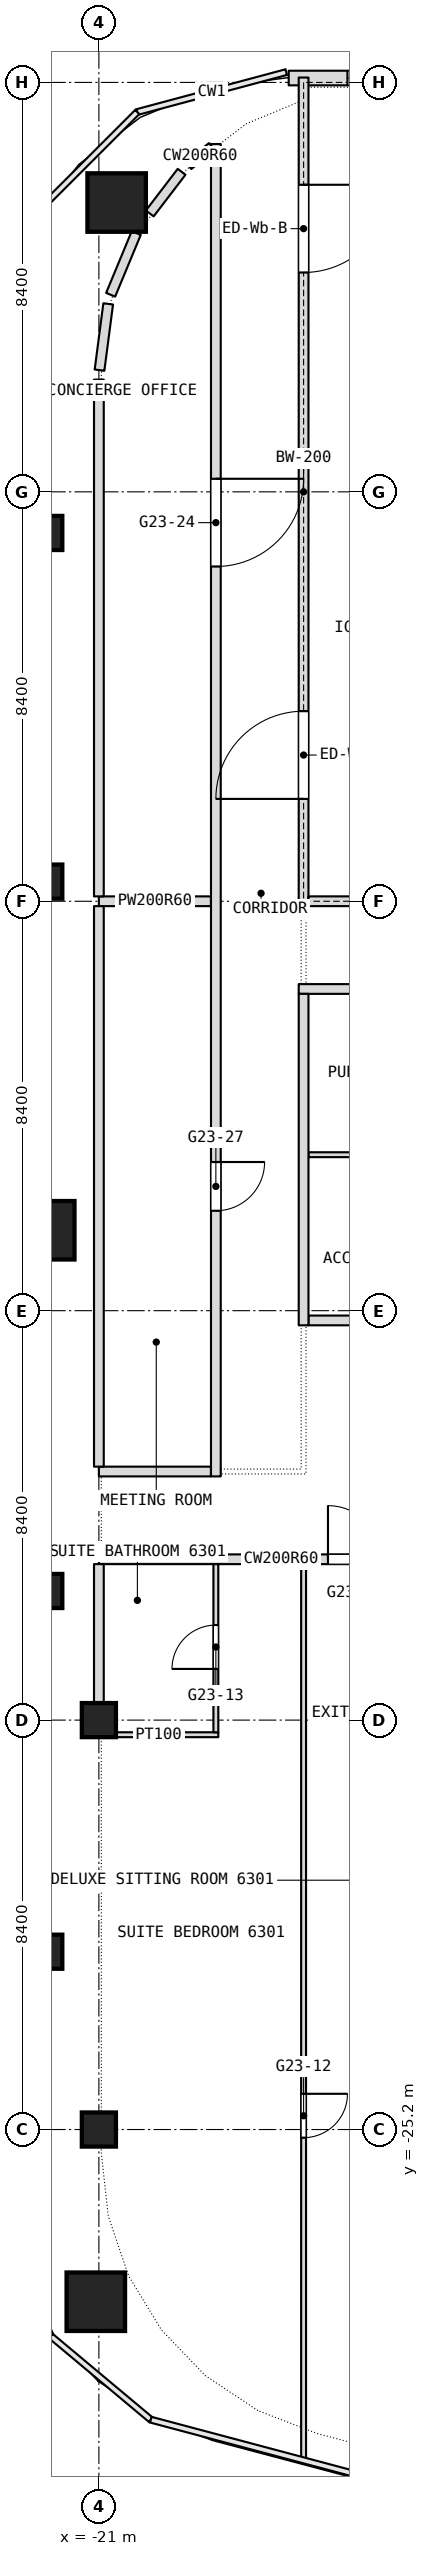
"""IFC4 building model, lengths in metres.
Left out: names, types, materials, properties, quantities, classifications, styles, units other than length and angle.
Written with IfcOpenShell. Run it as: python <this file> out.ifc"""

import sys

from ifc_helpers import new_model, si_unit, direction, frame, frame_2d, origin, origin_2d, place, context, subcontext, project, spatial, rectangle, extrude, element, fill, save


model = new_model("IFC4")
c1 = context("Model", 3, precision=1e-05, world=origin(), true_north=direction((0.0, 1.0)))
c2 = subcontext(c1, "Body", "Model", "MODEL_VIEW")
j1 = project(units=[si_unit("LENGTHUNIT", "METRE"), si_unit("PLANEANGLEUNIT", "RADIAN")], contexts=[c1])
p1 = place(None, origin())
s1 = spatial("IfcSite", under=j1, at=p1, CompositionType="ELEMENT")
p2 = place(p1, origin())
s2 = spatial("IfcBuilding", under=s1, at=p2, CompositionType="ELEMENT")
p3 = place(p2, frame((0.0, 0.0, 274.1)))
s3 = spatial("IfcBuildingStorey", under=s2, at=p3, CompositionType="ELEMENT", Elevation=274.1)
for number, where, z_axis, x_axis in (
    (1, (-21.063, -28.733, 0.0), (0.0, 0.0, 1.0), (1.0, 0.0, 0.0)),
    (2, (-20.635, 14.335, 0.0), (0.0, 0.0, 1.0), (1.0, 0.0, 0.0)),
    (3, (-22.1, -6.75, 0.0), (0.0, 0.0, 1.0), (1.0, 0.0, 0.0)),
):
    element("IfcColumn", number, at=place(p3, frame(where, z_axis=z_axis, x_axis=x_axis)), inside=s3, PredefinedType="COLUMN", context=c2, shape_type="SweptSolid", body=[
        extrude(rectangle(XDim=1.2, YDim=1.2, at=origin_2d()), origin(), (0.0, 0.0, 1.0), 3.6),
    ])
for number, where, z_axis, x_axis in (
    (4, (-21.0, -25.2, 0.0), (0.0, 0.0, 1.0), (1.0, 0.0, 0.0)),
    (5, (-21.0, -16.8, 0.0), (0.0, 0.0, 1.0), (1.0, 0.0, 0.0)),
    (6, (-22.1, -21.552, 0.0), (0.0, 0.0, 1.0), (1.0, 0.0, 0.0)),
    (7, (-22.1, -14.151, 0.0), (0.0, 0.0, 1.0), (1.0, 0.0, 0.0)),
    (8, (-22.1, 0.403, 0.0), (0.0, 0.0, 1.0), (1.0, 0.0, 0.0)),
    (9, (-22.1, 7.556, 0.0), (0.0, 0.0, 1.0), (1.0, 0.0, 0.0)),
):
    element("IfcColumn", number, at=place(p3, frame(where, z_axis=z_axis, x_axis=x_axis)), inside=s3, PredefinedType="COLUMN", context=c2, shape_type="SweptSolid", body=[
        extrude(rectangle(XDim=0.7, YDim=0.7, at=origin_2d()), origin(), (0.0, 0.0, 1.0), 3.6),
    ])
p4 = place(p3, frame((-21.0, -17.1, 0.0), z_axis=(0.0, 0.0, 1.0), x_axis=(1.0, 0.0, 0.0)))
e10 = element("IfcWall", 10, at=p4, inside=s3, PredefinedType="PARTITIONING", context=c2, shape_type="SweptSolid", body=[
    extrude(rectangle(XDim=2.45, YDim=0.1, at=frame_2d((1.225, 0.0))), origin(), (0.0, 0.0, 1.0), 3.34),
])
p5 = place(p3, frame((-21.0, -13.5, 0.0), z_axis=(0.0, 0.0, 1.0), x_axis=(1.0, 0.0, 0.0)))
e11 = element("IfcWall", 11, at=p5, inside=s3, PredefinedType="PARTITIONING", context=c2, shape_type="SweptSolid", body=[
    extrude(rectangle(XDim=6.1, YDim=0.2, at=frame_2d((3.05, 0.0))), origin(), (0.0, 0.0, 1.0), 3.34),
])
p6 = place(p5, frame((4.7, 0.0, 0.0)))
e12 = element("IfcOpeningElement", 12, at=p6, cuts=e11, PredefinedType="OPENING", context=c2, shape_type="SweptSolid", body=[
    extrude(rectangle(XDim=1.1, YDim=2.1, at=frame_2d((0.55, 1.05))), frame((0.0, 0.1, 0.0), z_axis=(0.0, -1.0, 0.0), x_axis=(1.0, 0.0, 0.0)), (0.0, 0.0, 1.0), 0.2),
])
p7 = place(p3, frame((-21.0, -11.7, 0.0), z_axis=(0.0, 0.0, 1.0), x_axis=(1.0, 0.0, 0.0)))
e13 = element("IfcWall", 13, at=p7, inside=s3, PredefinedType="PARTITIONING", context=c2, shape_type="SweptSolid", body=[
    extrude(rectangle(XDim=2.3, YDim=0.2, at=frame_2d((1.15, 0.0))), origin(), (0.0, 0.0, 1.0), 3.34),
])
p8 = place(p3, frame((-16.7, -8.6, 0.0), z_axis=(0.0, 0.0, 1.0), x_axis=(1.0, 0.0, 0.0)))
e14 = element("IfcWall", 14, at=p8, inside=s3, PredefinedType="PARTITIONING", context=c2, shape_type="SweptSolid", body=[
    extrude(rectangle(XDim=8.4, YDim=0.2, at=frame_2d((4.2, 0.0))), origin(), (0.0, 0.0, 1.0), 3.34),
])
p9 = place(p3, frame((-16.7, -5.2, 0.0), z_axis=(0.0, 0.0, 1.0), x_axis=(1.0, 0.0, 0.0)))
e15 = element("IfcWall", 15, at=p9, inside=s3, PredefinedType="PARTITIONING", context=c2, shape_type="SweptSolid", body=[
    extrude(rectangle(XDim=4.2, YDim=0.1, at=frame_2d((2.1, 0.0))), origin(), (0.0, 0.0, 1.0), 3.34),
])
p10 = place(p9, frame((1.55, 0.0, 0.0)))
e16 = element("IfcOpeningElement", 16, at=p10, cuts=e15, PredefinedType="OPENING", context=c2, shape_type="SweptSolid", body=[
    extrude(rectangle(XDim=0.9, YDim=2.1, at=frame_2d((0.45, 1.05))), frame((0.0, 0.05, 0.0), z_axis=(0.0, -1.0, 0.0), x_axis=(1.0, 0.0, 0.0)), (0.0, 0.0, 1.0), 0.1),
])
p11 = place(p3, frame((-16.9, -1.8, 0.0), z_axis=(0.0, 0.0, 1.0), x_axis=(1.0, 0.0, 0.0)))
e17 = element("IfcWall", 17, at=p11, inside=s3, PredefinedType="PARTITIONING", context=c2, shape_type="SweptSolid", body=[
    extrude(rectangle(XDim=33.8, YDim=0.2, at=frame_2d((16.9, 0.0))), origin(), (0.0, 0.0, 1.0), 3.34),
])
p12 = place(p11, frame((1.7, 0.0, 0.0)))
e18 = element("IfcOpeningElement", 18, at=p12, cuts=e17, PredefinedType="OPENING", context=c2, shape_type="SweptSolid", body=[
    extrude(rectangle(XDim=1.0, YDim=2.1, at=frame_2d((0.5, 1.05))), frame((0.0, 0.1, 0.0), z_axis=(0.0, -1.0, 0.0), x_axis=(1.0, 0.0, 0.0)), (0.0, 0.0, 1.0), 0.2),
])
p13 = place(p11, frame((5.9, 0.0, 0.0)))
e19 = element("IfcOpeningElement", 19, at=p13, cuts=e17, PredefinedType="OPENING", context=c2, shape_type="SweptSolid", body=[
    extrude(rectangle(XDim=1.0, YDim=2.1, at=frame_2d((0.5, 1.05))), frame((0.0, 0.1, 0.0), z_axis=(0.0, -1.0, 0.0), x_axis=(1.0, 0.0, 0.0)), (0.0, 0.0, 1.0), 0.2),
])
p14 = place(p11, frame((10.1, 0.0, 0.0)))
e20 = element("IfcOpeningElement", 20, at=p14, cuts=e17, PredefinedType="OPENING", context=c2, shape_type="SweptSolid", body=[
    extrude(rectangle(XDim=1.0, YDim=2.1, at=frame_2d((0.5, 1.05))), frame((0.0, 0.1, 0.0), z_axis=(0.0, -1.0, 0.0), x_axis=(1.0, 0.0, 0.0)), (0.0, 0.0, 1.0), 0.2),
])
p15 = place(p11, frame((16.0, 0.0, 0.0)))
e21 = element("IfcOpeningElement", 21, at=p15, cuts=e17, PredefinedType="OPENING", context=c2, shape_type="SweptSolid", body=[
    extrude(rectangle(XDim=1.8, YDim=2.1, at=frame_2d((0.9, 1.05))), frame((0.0, 0.1, 0.0), z_axis=(0.0, -1.0, 0.0), x_axis=(1.0, 0.0, 0.0)), (0.0, 0.0, 1.0), 0.2),
])
p16 = place(p11, frame((22.7, 0.0, 0.0)))
e22 = element("IfcOpeningElement", 22, at=p16, cuts=e17, PredefinedType="OPENING", context=c2, shape_type="SweptSolid", body=[
    extrude(rectangle(XDim=1.0, YDim=2.1, at=frame_2d((0.5, 1.05))), frame((0.0, 0.1, 0.0), z_axis=(0.0, -1.0, 0.0), x_axis=(1.0, 0.0, 0.0)), (0.0, 0.0, 1.0), 0.2),
])
p17 = place(p11, frame((26.9, 0.0, 0.0)))
e23 = element("IfcOpeningElement", 23, at=p17, cuts=e17, PredefinedType="OPENING", context=c2, shape_type="SweptSolid", body=[
    extrude(rectangle(XDim=1.0, YDim=2.1, at=frame_2d((0.5, 1.05))), frame((0.0, 0.1, 0.0), z_axis=(0.0, -1.0, 0.0), x_axis=(1.0, 0.0, 0.0)), (0.0, 0.0, 1.0), 0.2),
])
p18 = place(p11, frame((31.1, 0.0, 0.0)))
e24 = element("IfcOpeningElement", 24, at=p18, cuts=e17, PredefinedType="OPENING", context=c2, shape_type="SweptSolid", body=[
    extrude(rectangle(XDim=1.0, YDim=2.1, at=frame_2d((0.5, 1.05))), frame((0.0, 0.1, 0.0), z_axis=(0.0, -1.0, 0.0), x_axis=(1.0, 0.0, 0.0)), (0.0, 0.0, 1.0), 0.2),
])
p19 = place(p3, frame((-21.0, 0.0, 0.0), z_axis=(0.0, 0.0, 1.0), x_axis=(1.0, 0.0, 0.0)))
e25 = element("IfcWall", 25, at=p19, inside=s3, PredefinedType="PARTITIONING", context=c2, shape_type="SweptSolid", body=[
    extrude(rectangle(XDim=2.3, YDim=0.2, at=frame_2d((1.15, 0.0))), origin(), (0.0, 0.0, 1.0), 3.0),
])
p20 = place(p3, frame((-16.8, -31.957, 0.0), z_axis=(0.0, 0.0, 1.0), x_axis=(0.0, 1.0, 0.0)))
e26 = element("IfcWall", 26, at=p20, inside=s3, PredefinedType="PARTITIONING", context=c2, shape_type="SweptSolid", body=[
    extrude(rectangle(XDim=18.357, YDim=0.1, at=frame_2d((9.178, 0.0))), origin(), (0.0, 0.0, 1.0), 3.34),
])
p21 = place(p20, frame((6.59, 0.0, 0.0)))
e27 = element("IfcOpeningElement", 27, at=p21, cuts=e26, PredefinedType="OPENING", context=c2, shape_type="SweptSolid", body=[
    extrude(rectangle(XDim=0.9, YDim=2.1, at=frame_2d((0.45, 1.05))), frame((0.0, 0.05, 0.0), z_axis=(0.0, -1.0, 0.0), x_axis=(1.0, 0.0, 0.0)), (0.0, 0.0, 1.0), 0.1),
])
p22 = place(p3, frame((-16.8, -8.7, 0.0), z_axis=(0.0, 0.0, 1.0), x_axis=(0.0, 1.0, 0.0)))
e28 = element("IfcWall", 28, at=p22, inside=s3, PredefinedType="PARTITIONING", context=c2, shape_type="SweptSolid", body=[
    extrude(rectangle(XDim=6.8, YDim=0.2, at=frame_2d((3.4, 0.0))), origin(), (0.0, 0.0, 1.0), 3.34),
])
p23 = place(p3, frame((-18.6, -17.05, 0.0), z_axis=(0.0, 0.0, 1.0), x_axis=(0.0, 1.0, 0.0)))
e29 = element("IfcWall", 29, at=p23, inside=s3, PredefinedType="PARTITIONING", context=c2, shape_type="SweptSolid", body=[
    extrude(rectangle(XDim=3.45, YDim=0.1, at=frame_2d((1.725, 0.0))), origin(), (0.0, 0.0, 1.0), 3.34),
])
p24 = place(p23, frame((1.3, 0.0, 0.0)))
e30 = element("IfcOpeningElement", 30, at=p24, cuts=e29, PredefinedType="OPENING", context=c2, shape_type="SweptSolid", body=[
    extrude(rectangle(XDim=0.9, YDim=2.1, at=frame_2d((0.45, 1.05))), frame((0.0, 0.05, 0.0), z_axis=(0.0, -1.0, 0.0), x_axis=(1.0, 0.0, 0.0)), (0.0, 0.0, 1.0), 0.1),
])
p25 = place(p3, frame((-18.6, -11.8, 0.0), z_axis=(0.0, 0.0, 1.0), x_axis=(0.0, 1.0, 0.0)))
e31 = element("IfcWall", 31, at=p25, inside=s3, PredefinedType="PARTITIONING", context=c2, shape_type="SweptSolid", body=[
    extrude(rectangle(XDim=27.336, YDim=0.2, at=frame_2d((13.668, 0.0))), origin(), (0.0, 0.0, 1.0), 3.34),
])
p26 = place(p25, frame((18.668, 0.0, 0.0)))
e32 = element("IfcOpeningElement", 32, at=p26, cuts=e31, PredefinedType="OPENING", context=c2, shape_type="SweptSolid", body=[
    extrude(rectangle(XDim=1.8, YDim=2.1, at=frame_2d((0.9, 1.05))), frame((0.0, 0.1, 0.0), z_axis=(0.0, -1.0, 0.0), x_axis=(1.0, 0.0, 0.0)), (0.0, 0.0, 1.0), 0.2),
])
p27 = place(p25, frame((5.45, 0.0, 0.0)))
e33 = element("IfcOpeningElement", 33, at=p27, cuts=e31, PredefinedType="OPENING", context=c2, shape_type="SweptSolid", body=[
    extrude(rectangle(XDim=1.0, YDim=2.1, at=frame_2d((0.5, 1.05))), frame((0.0, 0.1, 0.0), z_axis=(0.0, -1.0, 0.0), x_axis=(1.0, 0.0, 0.0)), (0.0, 0.0, 1.0), 0.2),
])
p28 = place(p3, frame((-21.0, -17.05, 0.0), z_axis=(0.0, 0.0, 1.0), x_axis=(0.0, 1.0, 0.0)))
e34 = element("IfcWall", 34, at=p28, inside=s3, PredefinedType="PARTITIONING", context=c2, shape_type="SweptSolid", body=[
    extrude(rectangle(XDim=3.45, YDim=0.2, at=frame_2d((1.725, 0.0))), origin(), (0.0, 0.0, 1.0), 3.34),
])
p29 = place(p3, frame((-21.0, -11.6, 0.0), z_axis=(0.0, 0.0, 1.0), x_axis=(0.0, 1.0, 0.0)))
e35 = element("IfcWall", 35, at=p29, inside=s3, PredefinedType="PARTITIONING", context=c2, shape_type="SweptSolid", body=[
    extrude(rectangle(XDim=11.5, YDim=0.2, at=frame_2d((5.75, 0.0))), origin(), (0.0, 0.0, 1.0), 3.34),
])
p30 = place(p3, frame((-21.0, 0.1, 0.0), z_axis=(0.0, 0.0, 1.0), x_axis=(0.0, 1.0, 0.0)))
e36 = element("IfcWall", 36, at=p30, inside=s3, PredefinedType="PARTITIONING", context=c2, shape_type="SweptSolid", body=[
    extrude(rectangle(XDim=10.602, YDim=0.2, at=frame_2d((5.301, 0.0))), origin(), (0.0, 0.0, 1.0), 3.34),
])
p31 = place(p3, frame((-20.987, 10.897, 0.0), z_axis=(0.0, 0.0, 1.0), x_axis=(0.129841713905, 0.991534734303, 0.0)))
e37 = element("IfcWall", 37, at=p31, inside=s3, PredefinedType="PARTITIONING", context=c2, shape_type="SweptSolid", body=[
    extrude(rectangle(XDim=1.371, YDim=0.2, at=frame_2d((0.686, 0.0))), origin(), (0.0, 0.0, 1.0), 3.34),
])
p32 = place(p3, frame((-19.166, 15.103, 0.0), z_axis=(0.0, 0.0, 1.0), x_axis=(0.794663000987, 0.607050833837, 0.0)))
e38 = element("IfcWall", 38, at=p32, inside=s3, PredefinedType="PARTITIONING", context=c2, shape_type="SweptSolid", body=[
    extrude(rectangle(XDim=0.613, YDim=0.2, at=frame_2d((0.306, 0.0))), origin(), (0.0, 0.0, 1.0), 3.34),
])
p33 = place(p3, frame((-20.759, 12.443, 0.0), z_axis=(0.0, 0.0, 1.0), x_axis=(0.383540942064, 0.923523873953, 0.0)))
e39 = element("IfcWall", 39, at=p33, inside=s3, PredefinedType="PARTITIONING", context=c2, shape_type="SweptSolid", body=[
    extrude(rectangle(XDim=1.372, YDim=0.2, at=frame_2d((0.686, 0.0))), origin(), (0.0, 0.0, 1.0), 3.34),
])
p34 = place(p3, frame((-19.956, 14.112, 0.0), z_axis=(0.0, 0.0, 1.0), x_axis=(0.607458536541, 0.794351387223, 0.0)))
e40 = element("IfcWall", 40, at=p34, inside=s3, PredefinedType="PARTITIONING", context=c2, shape_type="SweptSolid", body=[
    extrude(rectangle(XDim=1.075, YDim=0.2, at=frame_2d((0.538, 0.0))), origin(), (0.0, 0.0, 1.0), 3.34),
])
p35 = place(p3, frame((-12.6, 16.89, 0.0), z_axis=(0.0, 0.0, 1.0), x_axis=(-1.0, 0.0, 0.0)))
e41 = element("IfcWall", 41, at=p35, inside=s3, PredefinedType="NOTDEFINED", context=c2, shape_type="SweptSolid", body=[
    extrude(rectangle(XDim=4.506, YDim=0.3, at=frame_2d((2.253, 0.0))), origin(), (0.0, 0.0, 1.0), 3.6),
])
p36 = place(p35, frame((0.9, 0.0, 0.9)))
e42 = element("IfcOpeningElement", 42, at=p36, cuts=e41, PredefinedType="OPENING", context=c2, shape_type="SweptSolid", body=[
    extrude(rectangle(XDim=2.4, YDim=2.1, at=frame_2d((1.2, 1.05))), frame((0.0, 0.15, 0.0), z_axis=(0.0, -1.0, 0.0), x_axis=(1.0, 0.0, 0.0)), (0.0, 0.0, 1.0), 0.3),
])
p37 = place(p3, frame((-16.8, -0.1, 0.0), z_axis=(0.0, 0.0, 1.0), x_axis=(0.0, 1.0, 0.0)))
e43 = element("IfcWall", 43, at=p37, inside=s3, PredefinedType="PARTITIONING", context=c2, shape_type="SweptSolid", body=[
    extrude(rectangle(XDim=17.0, YDim=0.2, at=frame_2d((8.5, 0.0))), origin(), (0.0, 0.0, 1.0), 3.34),
])
p38 = place(p37, frame((2.2, 0.0, 0.0)))
e44 = element("IfcOpeningElement", 44, at=p38, cuts=e43, PredefinedType="OPENING", context=c2, shape_type="SweptSolid", body=[
    extrude(rectangle(XDim=1.8, YDim=2.1, at=frame_2d((0.9, 1.05))), frame((0.0, 0.1, 0.0), z_axis=(0.0, -1.0, 0.0), x_axis=(1.0, 0.0, 0.0)), (0.0, 0.0, 1.0), 0.2),
])
p39 = place(p37, frame((13.0, 0.0, 0.0)))
e45 = element("IfcOpeningElement", 45, at=p39, cuts=e43, PredefinedType="OPENING", context=c2, shape_type="SweptSolid", body=[
    extrude(rectangle(XDim=1.8, YDim=2.1, at=frame_2d((0.9, 1.05))), frame((0.0, 0.1, 0.0), z_axis=(0.0, -1.0, 0.0), x_axis=(1.0, 0.0, 0.0)), (0.0, 0.0, 1.0), 0.2),
])
p40 = place(p3, frame((-16.7, 0.0, 0.0), z_axis=(0.0, 0.0, 1.0), x_axis=(1.0, 0.0, 0.0)))
e46 = element("IfcWall", 46, at=p40, inside=s3, PredefinedType="PARTITIONING", context=c2, shape_type="SweptSolid", body=[
    extrude(rectangle(XDim=5.0, YDim=0.2, at=frame_2d((2.5, 0.0))), origin(), (0.0, 0.0, 1.0), 3.0),
])
p41 = place(p6, origin())
e47 = element("IfcDoor", 47, at=p41, inside=s3, OperationType="SINGLE_SWING_RIGHT", PredefinedType="DOOR", context=c2, shape_type="SweptSolid", body=[
    extrude(rectangle(XDim=1.1, YDim=2.1, at=frame_2d((0.55, 1.05))), frame((0.0, 0.025, 0.0), z_axis=(0.0, -1.0, 0.0), x_axis=(1.0, 0.0, 0.0)), (0.0, 0.0, 1.0), 0.05),
])
fill(e12, e47)
p42 = place(p21, origin())
e48 = element("IfcDoor", 48, at=p42, inside=s3, OperationType="SINGLE_SWING_LEFT", PredefinedType="DOOR", context=c2, shape_type="SweptSolid", body=[
    extrude(rectangle(XDim=0.9, YDim=2.1, at=frame_2d((0.45, 1.05))), frame((0.0, 0.025, 0.0), z_axis=(0.0, -1.0, 0.0), x_axis=(1.0, 0.0, 0.0)), (0.0, 0.0, 1.0), 0.05),
])
fill(e27, e48)
p43 = place(p24, origin())
e49 = element("IfcDoor", 49, at=p43, inside=s3, OperationType="SINGLE_SWING_RIGHT", PredefinedType="DOOR", context=c2, shape_type="SweptSolid", body=[
    extrude(rectangle(XDim=0.9, YDim=2.1, at=frame_2d((0.45, 1.05))), frame((0.0, 0.025, 0.0), z_axis=(0.0, -1.0, 0.0), x_axis=(1.0, 0.0, 0.0)), (0.0, 0.0, 1.0), 0.05),
])
fill(e30, e49)
p44 = place(p26, origin())
e50 = element("IfcDoor", 50, at=p44, inside=s3, OperationType="DOUBLE_DOOR_SINGLE_SWING", PredefinedType="DOOR", context=c2, shape_type="SweptSolid", body=[
    extrude(rectangle(XDim=1.8, YDim=2.1, at=frame_2d((0.9, 1.05))), frame((0.0, 0.025, 0.0), z_axis=(0.0, -1.0, 0.0), x_axis=(1.0, 0.0, 0.0)), (0.0, 0.0, 1.0), 0.05),
])
fill(e32, e50)
p45 = place(p27, origin())
e51 = element("IfcDoor", 51, at=p45, inside=s3, OperationType="SINGLE_SWING_LEFT", PredefinedType="DOOR", context=c2, shape_type="SweptSolid", body=[
    extrude(rectangle(XDim=1.0, YDim=2.1, at=frame_2d((0.5, 1.05))), frame((0.0, 0.025, 0.0), z_axis=(0.0, -1.0, 0.0), x_axis=(1.0, 0.0, 0.0)), (0.0, 0.0, 1.0), 0.05),
])
fill(e33, e51)
p46 = place(p36, origin())
e52 = element("IfcWindow", 52, at=p46, inside=s3, PartitioningType="SINGLE_PANEL", PredefinedType="WINDOW", context=c2, shape_type="SweptSolid", body=[
    extrude(rectangle(XDim=2.4, YDim=2.1, at=frame_2d((1.2, 1.05))), frame((0.0, 0.03, 0.0), z_axis=(0.0, -1.0, 0.0), x_axis=(1.0, 0.0, 0.0)), (0.0, 0.0, 1.0), 0.06),
])
fill(e42, e52)
p47 = place(p38, origin())
e53 = element("IfcDoor", 53, at=p47, inside=s3, OperationType="DOUBLE_DOOR_SINGLE_SWING", PredefinedType="DOOR", context=c2, shape_type="SweptSolid", body=[
    extrude(rectangle(XDim=1.8, YDim=2.1, at=frame_2d((0.9, 1.05))), frame((0.0, 0.025, 0.0), z_axis=(0.0, -1.0, 0.0), x_axis=(1.0, 0.0, 0.0)), (0.0, 0.0, 1.0), 0.05),
])
fill(e44, e53)
p48 = place(p39, origin())
e54 = element("IfcDoor", 54, at=p48, inside=s3, OperationType="DOUBLE_DOOR_SINGLE_SWING", PredefinedType="DOOR", context=c2, shape_type="SweptSolid", body=[
    extrude(rectangle(XDim=1.8, YDim=2.1, at=frame_2d((0.9, 1.05))), frame((0.0, 0.025, 0.0), z_axis=(0.0, -1.0, 0.0), x_axis=(1.0, 0.0, 0.0)), (0.0, 0.0, 1.0), 0.05),
])
fill(e45, e54)
save(model, sys.argv[1])
